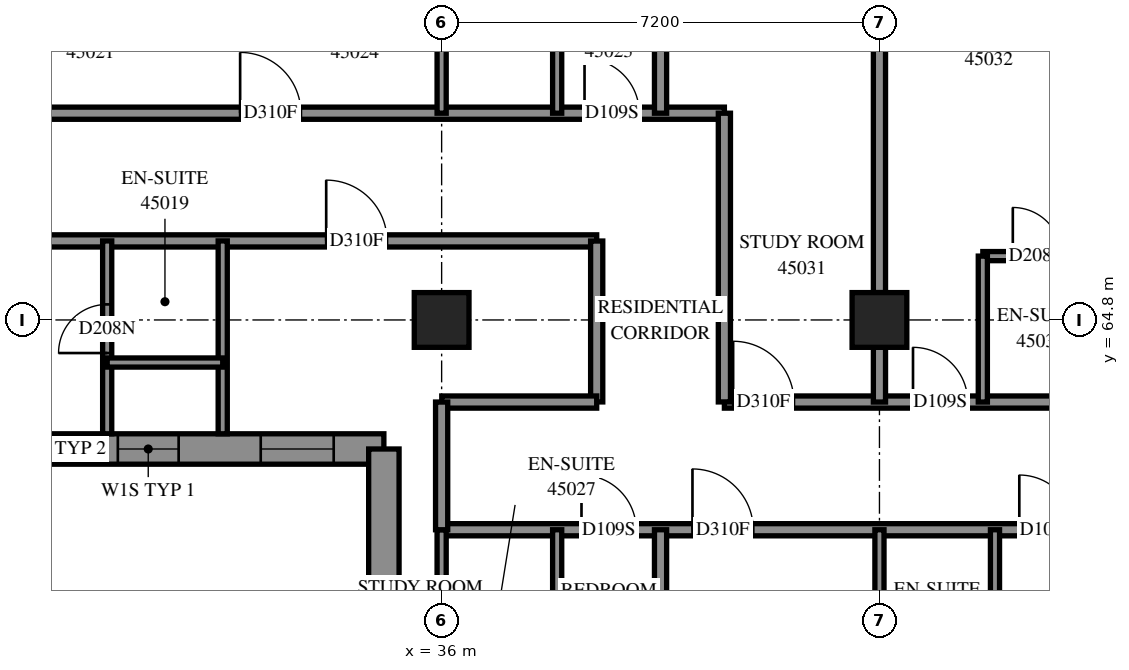
"""IFC4 building model, lengths in metres.
Left out: names, types, materials, properties, quantities, classifications, styles, units other than length and angle.
Written with IfcOpenShell. Run it as: python <this file> out.ifc"""

import sys

from ifc_helpers import new_model, si_unit, direction, frame, frame_2d, origin, origin_2d, place, context, subcontext, project, spatial, polyline, rectangle, outline, extrude, element, fill, save


model = new_model("IFC4")
c1 = context("Model", 3, precision=1e-05, world=origin(), true_north=direction((0.0, 1.0)))
c2 = subcontext(c1, "Body", "Model", "MODEL_VIEW")
j1 = project(units=[si_unit("LENGTHUNIT", "METRE"), si_unit("PLANEANGLEUNIT", "RADIAN")], contexts=[c1])
p1 = place(None, origin())
s1 = spatial("IfcSite", under=j1, at=p1, CompositionType="ELEMENT")
p2 = place(p1, origin())
s2 = spatial("IfcBuilding", under=s1, at=p2, CompositionType="ELEMENT")
p3 = place(p2, frame((0.0, 0.0, 166.0)))
s3 = spatial("IfcBuildingStorey", under=s2, at=p3, CompositionType="ELEMENT", Elevation=166.0)
for number, where, z_axis, x_axis in (
    (1, (36.0, 64.8, 0.0), (0.0, 0.0, 1.0), (1.0, 0.0, 0.0)),
    (2, (43.2, 64.8, 0.0), (0.0, 0.0, 1.0), (1.0, 0.0, 0.0)),
):
    element("IfcColumn", number, at=place(p3, frame(where, z_axis=z_axis, x_axis=x_axis)), inside=s3, PredefinedType="COLUMN", context=c2, shape_type="SweptSolid", body=[
        extrude(rectangle(XDim=0.9, YDim=0.9, at=origin_2d()), origin(), (0.0, 0.0, 1.0), 3.1),
    ])
p4 = place(p3, frame((19.478, 62.678, 0.0), z_axis=(0.0, 0.0, 1.0), x_axis=(1.0, 0.0, 0.0)))
e3 = element("IfcWall", 3, at=p4, inside=s3, PredefinedType="SOLIDWALL", context=c2, shape_type="SweptSolid", body=[
    extrude(outline(polyline([(-0.25, -0.25), (15.322, -0.25), (15.822, 0.25), (0.25, 0.25), (-0.25, -0.25)])), origin(), (0.0, 0.0, 1.0), 3.1),
])
p5 = place(p4, frame((2.522, 0.0, 0.45)))
e4 = element("IfcOpeningElement", 4, at=p5, cuts=e3, PredefinedType="OPENING", context=c2, shape_type="SweptSolid", body=[
    extrude(rectangle(XDim=2.8, YDim=2.5, at=frame_2d((1.4, 1.25))), frame((0.0, 0.26, 0.0), z_axis=(0.0, -1.0, 0.0), x_axis=(1.0, 0.0, 0.0)), (0.0, 0.0, 1.0), 0.52),
])
p6 = place(p4, frame((6.122, 0.0, 0.45)))
e5 = element("IfcOpeningElement", 5, at=p6, cuts=e3, PredefinedType="OPENING", context=c2, shape_type="SweptSolid", body=[
    extrude(rectangle(XDim=2.8, YDim=2.5, at=frame_2d((1.4, 1.25))), frame((0.0, 0.26, 0.0), z_axis=(0.0, -1.0, 0.0), x_axis=(1.0, 0.0, 0.0)), (0.0, 0.0, 1.0), 0.52),
])
p7 = place(p4, frame((0.686, 0.0, 0.45)))
e6 = element("IfcOpeningElement", 6, at=p7, cuts=e3, PredefinedType="OPENING", context=c2, shape_type="SweptSolid", body=[
    extrude(rectangle(XDim=1.2, YDim=2.5, at=frame_2d((0.6, 1.25))), frame((0.0, 0.26, 0.0), z_axis=(0.0, -1.0, 0.0), x_axis=(1.0, 0.0, 0.0)), (0.0, 0.0, 1.0), 0.52),
])
p8 = place(p4, frame((13.547, 0.0, 0.45)))
e7 = element("IfcOpeningElement", 7, at=p8, cuts=e3, PredefinedType="OPENING", context=c2, shape_type="SweptSolid", body=[
    extrude(rectangle(XDim=1.2, YDim=2.5, at=frame_2d((0.6, 1.25))), frame((0.0, 0.26, 0.0), z_axis=(0.0, -1.0, 0.0), x_axis=(1.0, 0.0, 0.0)), (0.0, 0.0, 1.0), 0.52),
])
p9 = place(p4, frame((9.547, 0.0, 0.45)))
e8 = element("IfcOpeningElement", 8, at=p9, cuts=e3, PredefinedType="OPENING", context=c2, shape_type="SweptSolid", body=[
    extrude(rectangle(XDim=1.3, YDim=2.5, at=frame_2d((0.65, 1.25))), frame((0.0, 0.26, 0.0), z_axis=(0.0, -1.0, 0.0), x_axis=(1.0, 0.0, 0.0)), (0.0, 0.0, 1.0), 0.52),
])
p10 = place(p4, frame((11.197, 0.0, 0.45)))
e9 = element("IfcOpeningElement", 9, at=p10, cuts=e3, PredefinedType="OPENING", context=c2, shape_type="SweptSolid", body=[
    extrude(rectangle(XDim=1.0, YDim=2.5, at=frame_2d((0.5, 1.25))), frame((0.0, 0.26, 0.0), z_axis=(0.0, -1.0, 0.0), x_axis=(1.0, 0.0, 0.0)), (0.0, 0.0, 1.0), 0.52),
])
p11 = place(p3, frame((35.05, 62.678, 0.0), z_axis=(0.0, 0.0, 1.0), x_axis=(0.0, -1.0, 0.0)))
e10 = element("IfcWall", 10, at=p11, inside=s3, PredefinedType="SOLIDWALL", context=c2, shape_type="SweptSolid", body=[
    extrude(outline(polyline([(0.25, -0.25), (6.278, -0.25), (5.778, 0.25), (-0.25, 0.25), (0.25, -0.25)])), origin(), (0.0, 0.0, 1.0), 3.1),
])
p12 = place(p11, frame((2.103, 0.0, 0.45)))
e11 = element("IfcOpeningElement", 11, at=p12, cuts=e10, PredefinedType="OPENING", context=c2, shape_type="SweptSolid", body=[
    extrude(rectangle(XDim=1.3, YDim=2.5, at=frame_2d((0.65, 1.25))), frame((0.0, 0.26, 0.0), z_axis=(0.0, -1.0, 0.0), x_axis=(1.0, 0.0, 0.0)), (0.0, 0.0, 1.0), 0.52),
])
p13 = place(p11, frame((3.853, 0.0, 0.45)))
e12 = element("IfcOpeningElement", 12, at=p13, cuts=e10, PredefinedType="OPENING", context=c2, shape_type="SweptSolid", body=[
    extrude(rectangle(XDim=0.8, YDim=2.5, at=frame_2d((0.4, 1.25))), frame((0.0, 0.26, 0.0), z_axis=(0.0, -1.0, 0.0), x_axis=(1.0, 0.0, 0.0)), (0.0, 0.0, 1.0), 0.52),
])
p14 = place(p3, frame((21.602, 68.2, 0.0), z_axis=(0.0, 0.0, 1.0), x_axis=(1.0, 0.0, 0.0)))
e13 = element("IfcWall", 13, at=p14, inside=s3, PredefinedType="PARTITIONING", context=c2, shape_type="SweptSolid", body=[
    extrude(rectangle(XDim=19.048, YDim=0.2, at=frame_2d((9.524, 0.0))), origin(), (0.0, 0.0, 1.0), 3.1),
])
p15 = place(p14, frame((3.998, 0.0, 0.0)))
e14 = element("IfcOpeningElement", 14, at=p15, cuts=e13, PredefinedType="OPENING", context=c2, shape_type="SweptSolid", body=[
    extrude(rectangle(XDim=0.9, YDim=2.1, at=frame_2d((0.45, 1.05))), frame((0.0, 0.11, 0.0), z_axis=(0.0, -1.0, 0.0), x_axis=(1.0, 0.0, 0.0)), (0.0, 0.0, 1.0), 0.22),
])
p16 = place(p14, frame((11.084, 0.0, 0.0)))
e15 = element("IfcOpeningElement", 15, at=p16, cuts=e13, PredefinedType="OPENING", context=c2, shape_type="SweptSolid", body=[
    extrude(rectangle(XDim=1.0, YDim=2.1, at=frame_2d((0.5, 1.05))), frame((0.0, 0.11, 0.0), z_axis=(0.0, -1.0, 0.0), x_axis=(1.0, 0.0, 0.0)), (0.0, 0.0, 1.0), 0.22),
])
p17 = place(p14, frame((16.748, 0.0, 0.0)))
e16 = element("IfcOpeningElement", 16, at=p17, cuts=e13, PredefinedType="OPENING", context=c2, shape_type="SweptSolid", body=[
    extrude(rectangle(XDim=0.9, YDim=2.1, at=frame_2d((0.45, 1.05))), frame((0.0, 0.11, 0.0), z_axis=(0.0, -1.0, 0.0), x_axis=(1.0, 0.0, 0.0)), (0.0, 0.0, 1.0), 0.22),
])
p18 = place(p3, frame((36.0, 61.35, 0.0), z_axis=(0.0, 0.0, 1.0), x_axis=(1.0, 0.0, 0.0)))
e17 = element("IfcWall", 17, at=p18, inside=s3, PredefinedType="PARTITIONING", context=c2, shape_type="SweptSolid", body=[
    extrude(rectangle(XDim=16.95, YDim=0.2, at=frame_2d((8.475, 0.0))), origin(), (0.0, 0.0, 1.0), 3.1),
])
p19 = place(p18, frame((2.3, 0.0, 0.0)))
e18 = element("IfcOpeningElement", 18, at=p19, cuts=e17, PredefinedType="OPENING", context=c2, shape_type="SweptSolid", body=[
    extrude(rectangle(XDim=0.9, YDim=2.1, at=frame_2d((0.45, 1.05))), frame((0.0, 0.11, 0.0), z_axis=(0.0, -1.0, 0.0), x_axis=(1.0, 0.0, 0.0)), (0.0, 0.0, 1.0), 0.22),
])
p20 = place(p18, frame((4.125, 0.0, 0.0)))
e19 = element("IfcOpeningElement", 19, at=p20, cuts=e17, PredefinedType="OPENING", context=c2, shape_type="SweptSolid", body=[
    extrude(rectangle(XDim=1.0, YDim=2.1, at=frame_2d((0.5, 1.05))), frame((0.0, 0.11, 0.0), z_axis=(0.0, -1.0, 0.0), x_axis=(1.0, 0.0, 0.0)), (0.0, 0.0, 1.0), 0.22),
])
p21 = place(p18, frame((9.5, 0.0, 0.0)))
e20 = element("IfcOpeningElement", 20, at=p21, cuts=e17, PredefinedType="OPENING", context=c2, shape_type="SweptSolid", body=[
    extrude(rectangle(XDim=0.9, YDim=2.1, at=frame_2d((0.45, 1.05))), frame((0.0, 0.11, 0.0), z_axis=(0.0, -1.0, 0.0), x_axis=(1.0, 0.0, 0.0)), (0.0, 0.0, 1.0), 0.22),
])
p22 = place(p18, frame((11.635, 0.0, 0.0)))
e21 = element("IfcOpeningElement", 21, at=p22, cuts=e17, PredefinedType="OPENING", context=c2, shape_type="SweptSolid", body=[
    extrude(rectangle(XDim=1.0, YDim=2.1, at=frame_2d((0.5, 1.05))), frame((0.0, 0.11, 0.0), z_axis=(0.0, -1.0, 0.0), x_axis=(1.0, 0.0, 0.0)), (0.0, 0.0, 1.0), 0.22),
])
p23 = place(p18, frame((15.803, 0.0, 0.0)))
e22 = element("IfcOpeningElement", 22, at=p23, cuts=e17, PredefinedType="OPENING", context=c2, shape_type="SweptSolid", body=[
    extrude(rectangle(XDim=1.0, YDim=2.1, at=frame_2d((0.5, 1.05))), frame((0.0, 0.11, 0.0), z_axis=(0.0, -1.0, 0.0), x_axis=(1.0, 0.0, 0.0)), (0.0, 0.0, 1.0), 0.22),
])
p24 = place(p3, frame((21.6, 66.1, 0.0), z_axis=(0.0, 0.0, 1.0), x_axis=(1.0, 0.0, 0.0)))
e23 = element("IfcWall", 23, at=p24, inside=s3, PredefinedType="PARTITIONING", context=c2, shape_type="SweptSolid", body=[
    extrude(rectangle(XDim=16.95, YDim=0.2, at=frame_2d((8.475, 0.0))), origin(), (0.0, 0.0, 1.0), 3.1),
])
p25 = place(p24, frame((0.546, 0.0, 0.0)))
e24 = element("IfcOpeningElement", 24, at=p25, cuts=e23, PredefinedType="OPENING", context=c2, shape_type="SweptSolid", body=[
    extrude(rectangle(XDim=0.9, YDim=2.1, at=frame_2d((0.45, 1.05))), frame((0.0, 0.11, 0.0), z_axis=(0.0, -1.0, 0.0), x_axis=(1.0, 0.0, 0.0)), (0.0, 0.0, 1.0), 0.22),
])
p26 = place(p24, frame((12.502, 0.0, 0.0)))
e25 = element("IfcOpeningElement", 25, at=p26, cuts=e23, PredefinedType="OPENING", context=c2, shape_type="SweptSolid", body=[
    extrude(rectangle(XDim=1.0, YDim=2.1, at=frame_2d((0.5, 1.05))), frame((0.0, 0.11, 0.0), z_axis=(0.0, -1.0, 0.0), x_axis=(1.0, 0.0, 0.0)), (0.0, 0.0, 1.0), 0.22),
])
p27 = place(p3, frame((40.65, 63.45, 0.0), z_axis=(0.0, 0.0, 1.0), x_axis=(1.0, 0.0, 0.0)))
e26 = element("IfcWall", 26, at=p27, inside=s3, PredefinedType="PARTITIONING", context=c2, shape_type="SweptSolid", body=[
    extrude(rectangle(XDim=9.75, YDim=0.2, at=frame_2d((4.875, 0.0))), origin(), (0.0, 0.0, 1.0), 3.1),
])
p28 = place(p27, frame((0.144, 0.0, 0.0)))
e27 = element("IfcOpeningElement", 27, at=p28, cuts=e26, PredefinedType="OPENING", context=c2, shape_type="SweptSolid", body=[
    extrude(rectangle(XDim=1.0, YDim=2.1, at=frame_2d((0.5, 1.05))), frame((0.0, 0.11, 0.0), z_axis=(0.0, -1.0, 0.0), x_axis=(1.0, 0.0, 0.0)), (0.0, 0.0, 1.0), 0.22),
])
p29 = place(p27, frame((3.102, 0.0, 0.0)))
e28 = element("IfcOpeningElement", 28, at=p29, cuts=e26, PredefinedType="OPENING", context=c2, shape_type="SweptSolid", body=[
    extrude(rectangle(XDim=0.9, YDim=2.1, at=frame_2d((0.45, 1.05))), frame((0.0, 0.11, 0.0), z_axis=(0.0, -1.0, 0.0), x_axis=(1.0, 0.0, 0.0)), (0.0, 0.0, 1.0), 0.22),
])
p30 = place(p27, frame((8.319, 0.0, 0.0)))
e29 = element("IfcOpeningElement", 29, at=p30, cuts=e26, PredefinedType="OPENING", context=c2, shape_type="SweptSolid", body=[
    extrude(rectangle(XDim=0.9, YDim=2.1, at=frame_2d((0.45, 1.05))), frame((0.0, 0.11, 0.0), z_axis=(0.0, -1.0, 0.0), x_axis=(1.0, 0.0, 0.0)), (0.0, 0.0, 1.0), 0.22),
])
p31 = place(p3, frame((43.2, 65.25, 0.0), z_axis=(0.0, 0.0, 1.0), x_axis=(0.0, 1.0, 0.0)))
e30 = element("IfcWall", 30, at=p31, inside=s3, PredefinedType="PARTITIONING", context=c2, shape_type="SweptSolid", body=[
    extrude(rectangle(XDim=6.3, YDim=0.2, at=frame_2d((3.15, 0.0))), origin(), (0.0, 0.0, 1.0), 3.1),
])
p32 = place(p3, frame((40.65, 63.452, 0.0), z_axis=(0.0, 0.0, 1.0), x_axis=(0.0, 1.0, 0.0)))
e31 = element("IfcWall", 31, at=p32, inside=s3, PredefinedType="PARTITIONING", context=c2, shape_type="SweptSolid", body=[
    extrude(rectangle(XDim=4.748, YDim=0.2, at=frame_2d((2.374, 0.0))), origin(), (0.0, 0.0, 1.0), 3.1),
])
p33 = place(p3, frame((39.6, 68.2, 0.0), z_axis=(0.0, 0.0, 1.0), x_axis=(0.0, 1.0, 0.0)))
e32 = element("IfcWall", 32, at=p33, inside=s3, PredefinedType="PARTITIONING", context=c2, shape_type="SweptSolid", body=[
    extrude(rectangle(XDim=4.693, YDim=0.2, at=frame_2d((2.347, 0.0))), origin(), (0.0, 0.0, 1.0), 3.1),
])
p34 = place(p3, frame((39.6, 56.9, 0.0), z_axis=(0.0, 0.0, 1.0), x_axis=(0.0, 1.0, 0.0)))
e33 = element("IfcWall", 33, at=p34, inside=s3, PredefinedType="PARTITIONING", context=c2, shape_type="SweptSolid", body=[
    extrude(rectangle(XDim=4.45, YDim=0.2, at=frame_2d((2.225, 0.0))), origin(), (0.0, 0.0, 1.0), 3.1),
])
p35 = place(p3, frame((44.9, 65.85, 0.0), z_axis=(0.0, 0.0, 1.0), x_axis=(1.0, 0.0, 0.0)))
e34 = element("IfcWall", 34, at=p35, inside=s3, PredefinedType="PARTITIONING", context=c2, shape_type="SweptSolid", body=[
    extrude(rectangle(XDim=3.8, YDim=0.15, at=frame_2d((1.9, 0.0))), origin(), (0.0, 0.0, 1.0), 3.1),
])
p36 = place(p35, frame((0.493, 0.0, 0.0)))
e35 = element("IfcOpeningElement", 35, at=p36, cuts=e34, PredefinedType="OPENING", context=c2, shape_type="SweptSolid", body=[
    extrude(rectangle(XDim=0.8, YDim=2.1, at=frame_2d((0.4, 1.05))), frame((0.0, 0.085, 0.0), z_axis=(0.0, -1.0, 0.0), x_axis=(1.0, 0.0, 0.0)), (0.0, 0.0, 1.0), 0.17),
])
p37 = place(p35, frame((2.507, 0.0, 0.0)))
e36 = element("IfcOpeningElement", 36, at=p37, cuts=e34, PredefinedType="OPENING", context=c2, shape_type="SweptSolid", body=[
    extrude(rectangle(XDim=0.8, YDim=2.1, at=frame_2d((0.4, 1.05))), frame((0.0, 0.085, 0.0), z_axis=(0.0, -1.0, 0.0), x_axis=(1.0, 0.0, 0.0)), (0.0, 0.0, 1.0), 0.17),
])
p38 = place(p3, frame((32.4, 62.928, 0.0), z_axis=(0.0, 0.0, 1.0), x_axis=(0.0, 1.0, 0.0)))
e37 = element("IfcWall", 37, at=p38, inside=s3, PredefinedType="PARTITIONING", context=c2, shape_type="SweptSolid", body=[
    extrude(rectangle(XDim=3.172, YDim=0.15, at=frame_2d((1.586, 0.0))), origin(), (0.0, 0.0, 1.0), 3.1),
])
p39 = place(p3, frame((30.5, 62.928, 0.0), z_axis=(0.0, 0.0, 1.0), x_axis=(0.0, 1.0, 0.0)))
e38 = element("IfcWall", 38, at=p39, inside=s3, PredefinedType="PARTITIONING", context=c2, shape_type="SweptSolid", body=[
    extrude(rectangle(XDim=3.172, YDim=0.15, at=frame_2d((1.586, 0.0))), origin(), (0.0, 0.0, 1.0), 3.1),
])
p40 = place(p39, frame((1.328, 0.0, 0.0)))
e39 = element("IfcOpeningElement", 39, at=p40, cuts=e38, PredefinedType="OPENING", context=c2, shape_type="SweptSolid", body=[
    extrude(rectangle(XDim=0.8, YDim=2.1, at=frame_2d((0.4, 1.05))), frame((0.0, 0.085, 0.0), z_axis=(0.0, -1.0, 0.0), x_axis=(1.0, 0.0, 0.0)), (0.0, 0.0, 1.0), 0.17),
])
p41 = place(p3, frame((38.55, 63.452, 0.0), z_axis=(0.0, 0.0, 1.0), x_axis=(0.0, 1.0, 0.0)))
e40 = element("IfcWall", 40, at=p41, inside=s3, PredefinedType="PARTITIONING", context=c2, shape_type="SweptSolid", body=[
    extrude(rectangle(XDim=2.646, YDim=0.2, at=frame_2d((1.323, 0.0))), origin(), (0.0, 0.0, 1.0), 3.1),
])
p42 = place(p3, frame((36.002, 63.45, 0.0), z_axis=(0.0, 0.0, 1.0), x_axis=(1.0, 0.0, 0.0)))
e41 = element("IfcWall", 41, at=p42, inside=s3, PredefinedType="PARTITIONING", context=c2, shape_type="SweptSolid", body=[
    extrude(rectangle(XDim=2.548, YDim=0.2, at=frame_2d((1.274, 0.0))), origin(), (0.0, 0.0, 1.0), 3.1),
])
p43 = place(p3, frame((37.9, 58.95, 0.0), z_axis=(0.0, 0.0, 1.0), x_axis=(0.0, 1.0, 0.0)))
e42 = element("IfcWall", 42, at=p43, inside=s3, PredefinedType="PARTITIONING", context=c2, shape_type="SweptSolid", body=[
    extrude(rectangle(XDim=2.4, YDim=0.15, at=frame_2d((1.2, 0.0))), origin(), (0.0, 0.0, 1.0), 3.1),
])
p44 = place(p3, frame((36.0, 58.95, 0.0), z_axis=(0.0, 0.0, 1.0), x_axis=(0.0, 1.0, 0.0)))
e43 = element("IfcWall", 43, at=p44, inside=s3, PredefinedType="PARTITIONING", context=c2, shape_type="SweptSolid", body=[
    extrude(rectangle(XDim=2.4, YDim=0.15, at=frame_2d((1.2, 0.0))), origin(), (0.0, 0.0, 1.0), 2.6),
])
for number, where, z_axis, x_axis in (
    (44, (45.1, 58.95, 0.0), (0.0, 0.0, 1.0), (0.0, 1.0, 0.0)),
    (45, (43.2, 58.95, 0.0), (0.0, 0.0, 1.0), (0.0, 1.0, 0.0)),
    (46, (37.9, 68.2, 0.0), (0.0, 0.0, 1.0), (0.0, 1.0, 0.0)),
    (47, (36.0, 68.2, 0.0), (0.0, 0.0, 1.0), (0.0, 1.0, 0.0)),
    (48, (44.9, 63.45, 0.0), (0.0, 0.0, 1.0), (0.0, 1.0, 0.0)),
):
    element("IfcWall", number, at=place(p3, frame(where, z_axis=z_axis, x_axis=x_axis)), inside=s3, PredefinedType="PARTITIONING", context=c2, shape_type="SweptSolid", body=[
        extrude(rectangle(XDim=2.4, YDim=0.15, at=frame_2d((1.2, 0.0))), origin(), (0.0, 0.0, 1.0), 3.1),
    ])
p45 = place(p3, frame((36.0, 61.35, 0.0), z_axis=(0.0, 0.0, 1.0), x_axis=(0.0, 1.0, 0.0)))
e49 = element("IfcWall", 49, at=p45, inside=s3, PredefinedType="PARTITIONING", context=c2, shape_type="SweptSolid", body=[
    extrude(rectangle(XDim=2.1, YDim=0.2, at=frame_2d((1.05, 0.0))), origin(), (0.0, 0.0, 1.0), 2.6),
])
p46 = place(p3, frame((30.5, 64.1, 0.0), z_axis=(0.0, 0.0, 1.0), x_axis=(1.0, 0.0, 0.0)))
e50 = element("IfcWall", 50, at=p46, inside=s3, PredefinedType="PARTITIONING", context=c2, shape_type="SweptSolid", body=[
    extrude(rectangle(XDim=1.9, YDim=0.15, at=frame_2d((0.95, 0.0))), origin(), (0.0, 0.0, 1.0), 3.1),
])
p47 = place(p3, frame((43.2, 63.45, 0.0), z_axis=(0.0, 0.0, 1.0), x_axis=(0.0, 1.0, 0.0)))
e51 = element("IfcWall", 51, at=p47, inside=s3, PredefinedType="PARTITIONING", context=c2, shape_type="SweptSolid", body=[
    extrude(rectangle(XDim=0.9, YDim=0.2, at=frame_2d((0.45, 0.0))), origin(), (0.0, 0.0, 1.0), 3.1),
])
p48 = place(p8, origin())
e52 = element("IfcWindow", 52, at=p48, inside=s3, PartitioningType="SINGLE_PANEL", PredefinedType="WINDOW", context=c2, shape_type="SweptSolid", body=[
    extrude(rectangle(XDim=1.2, YDim=2.5, at=frame_2d((0.6, 1.25))), frame((0.0, 0.18, 0.0), z_axis=(0.0, -1.0, 0.0), x_axis=(1.0, 0.0, 0.0)), (0.0, 0.0, 1.0), 0.06),
])
fill(e7, e52)
p49 = place(p40, origin())
e53 = element("IfcDoor", 53, at=p49, inside=s3, OperationType="SINGLE_SWING_RIGHT", PredefinedType="DOOR", context=c2, shape_type="SweptSolid", body=[
    extrude(rectangle(XDim=0.8, YDim=2.1, at=frame_2d((0.4, 1.05))), frame((0.0, 0.025, 0.0), z_axis=(0.0, -1.0, 0.0), x_axis=(1.0, 0.0, 0.0)), (0.0, 0.0, 1.0), 0.05),
])
fill(e39, e53)
p50 = place(p16, origin())
e54 = element("IfcDoor", 54, at=p50, inside=s3, OperationType="SINGLE_SWING_RIGHT", PredefinedType="DOOR", context=c2, shape_type="SweptSolid", body=[
    extrude(rectangle(XDim=1.0, YDim=2.1, at=frame_2d((0.5, 1.05))), frame((0.0, 0.025, 0.0), z_axis=(0.0, -1.0, 0.0), x_axis=(1.0, 0.0, 0.0)), (0.0, 0.0, 1.0), 0.05),
])
fill(e15, e54)
p51 = place(p17, origin())
e55 = element("IfcDoor", 55, at=p51, inside=s3, OperationType="SINGLE_SWING_RIGHT", PredefinedType="DOOR", context=c2, shape_type="SweptSolid", body=[
    extrude(rectangle(XDim=0.9, YDim=2.1, at=frame_2d((0.45, 1.05))), frame((0.0, 0.025, 0.0), z_axis=(0.0, -1.0, 0.0), x_axis=(1.0, 0.0, 0.0)), (0.0, 0.0, 1.0), 0.05),
])
fill(e16, e55)
p52 = place(p26, origin())
e56 = element("IfcDoor", 56, at=p52, inside=s3, OperationType="SINGLE_SWING_RIGHT", PredefinedType="DOOR", context=c2, shape_type="SweptSolid", body=[
    extrude(rectangle(XDim=1.0, YDim=2.1, at=frame_2d((0.5, 1.05))), frame((0.0, 0.025, 0.0), z_axis=(0.0, -1.0, 0.0), x_axis=(1.0, 0.0, 0.0)), (0.0, 0.0, 1.0), 0.05),
])
fill(e25, e56)
p53 = place(p19, origin())
e57 = element("IfcDoor", 57, at=p53, inside=s3, OperationType="SINGLE_SWING_LEFT", PredefinedType="DOOR", context=c2, shape_type="SweptSolid", body=[
    extrude(rectangle(XDim=0.9, YDim=2.1, at=frame_2d((0.45, 1.05))), frame((0.0, 0.025, 0.0), z_axis=(0.0, -1.0, 0.0), x_axis=(1.0, 0.0, 0.0)), (0.0, 0.0, 1.0), 0.05),
])
fill(e18, e57)
p54 = place(p20, origin())
e58 = element("IfcDoor", 58, at=p54, inside=s3, OperationType="SINGLE_SWING_RIGHT", PredefinedType="DOOR", context=c2, shape_type="SweptSolid", body=[
    extrude(rectangle(XDim=1.0, YDim=2.1, at=frame_2d((0.5, 1.05))), frame((0.0, 0.025, 0.0), z_axis=(0.0, -1.0, 0.0), x_axis=(1.0, 0.0, 0.0)), (0.0, 0.0, 1.0), 0.05),
])
fill(e19, e58)
p55 = place(p21, origin())
e59 = element("IfcDoor", 59, at=p55, inside=s3, OperationType="SINGLE_SWING_LEFT", PredefinedType="DOOR", context=c2, shape_type="SweptSolid", body=[
    extrude(rectangle(XDim=0.9, YDim=2.1, at=frame_2d((0.45, 1.05))), frame((0.0, 0.025, 0.0), z_axis=(0.0, -1.0, 0.0), x_axis=(1.0, 0.0, 0.0)), (0.0, 0.0, 1.0), 0.05),
])
fill(e20, e59)
p56 = place(p28, origin())
e60 = element("IfcDoor", 60, at=p56, inside=s3, OperationType="SINGLE_SWING_LEFT", PredefinedType="DOOR", context=c2, shape_type="SweptSolid", body=[
    extrude(rectangle(XDim=1.0, YDim=2.1, at=frame_2d((0.5, 1.05))), frame((0.0, 0.025, 0.0), z_axis=(0.0, -1.0, 0.0), x_axis=(1.0, 0.0, 0.0)), (0.0, 0.0, 1.0), 0.05),
])
fill(e27, e60)
p57 = place(p29, origin())
e61 = element("IfcDoor", 61, at=p57, inside=s3, OperationType="SINGLE_SWING_RIGHT", PredefinedType="DOOR", context=c2, shape_type="SweptSolid", body=[
    extrude(rectangle(XDim=0.9, YDim=2.1, at=frame_2d((0.45, 1.05))), frame((0.0, 0.025, 0.0), z_axis=(0.0, -1.0, 0.0), x_axis=(1.0, 0.0, 0.0)), (0.0, 0.0, 1.0), 0.05),
])
fill(e28, e61)
p58 = place(p36, origin())
e62 = element("IfcDoor", 62, at=p58, inside=s3, OperationType="SINGLE_SWING_RIGHT", PredefinedType="DOOR", context=c2, shape_type="SweptSolid", body=[
    extrude(rectangle(XDim=0.8, YDim=2.1, at=frame_2d((0.4, 1.05))), frame((0.0, 0.025, 0.0), z_axis=(0.0, -1.0, 0.0), x_axis=(1.0, 0.0, 0.0)), (0.0, 0.0, 1.0), 0.05),
])
fill(e35, e62)
p59 = place(p9, origin())
e63 = element("IfcWindow", 63, at=p59, inside=s3, PartitioningType="SINGLE_PANEL", PredefinedType="WINDOW", context=c2, shape_type="SweptSolid", body=[
    extrude(rectangle(XDim=1.3, YDim=2.5, at=frame_2d((0.65, 1.25))), frame((0.0, 0.18, 0.0), z_axis=(0.0, -1.0, 0.0), x_axis=(1.0, 0.0, 0.0)), (0.0, 0.0, 1.0), 0.06),
])
fill(e8, e63)
p60 = place(p10, origin())
e64 = element("IfcWindow", 64, at=p60, inside=s3, PartitioningType="SINGLE_PANEL", PredefinedType="WINDOW", context=c2, shape_type="SweptSolid", body=[
    extrude(rectangle(XDim=1.0, YDim=2.5, at=frame_2d((0.5, 1.25))), frame((0.0, 0.18, 0.0), z_axis=(0.0, -1.0, 0.0), x_axis=(1.0, 0.0, 0.0)), (0.0, 0.0, 1.0), 0.06),
])
fill(e9, e64)
p61 = place(p12, origin())
e65 = element("IfcWindow", 65, at=p61, inside=s3, PartitioningType="SINGLE_PANEL", PredefinedType="WINDOW", context=c2, shape_type="SweptSolid", body=[
    extrude(rectangle(XDim=1.3, YDim=2.5, at=frame_2d((0.65, 1.25))), frame((0.0, 0.18, 0.0), z_axis=(0.0, -1.0, 0.0), x_axis=(1.0, 0.0, 0.0)), (0.0, 0.0, 1.0), 0.06),
])
fill(e11, e65)
save(model, sys.argv[1])
